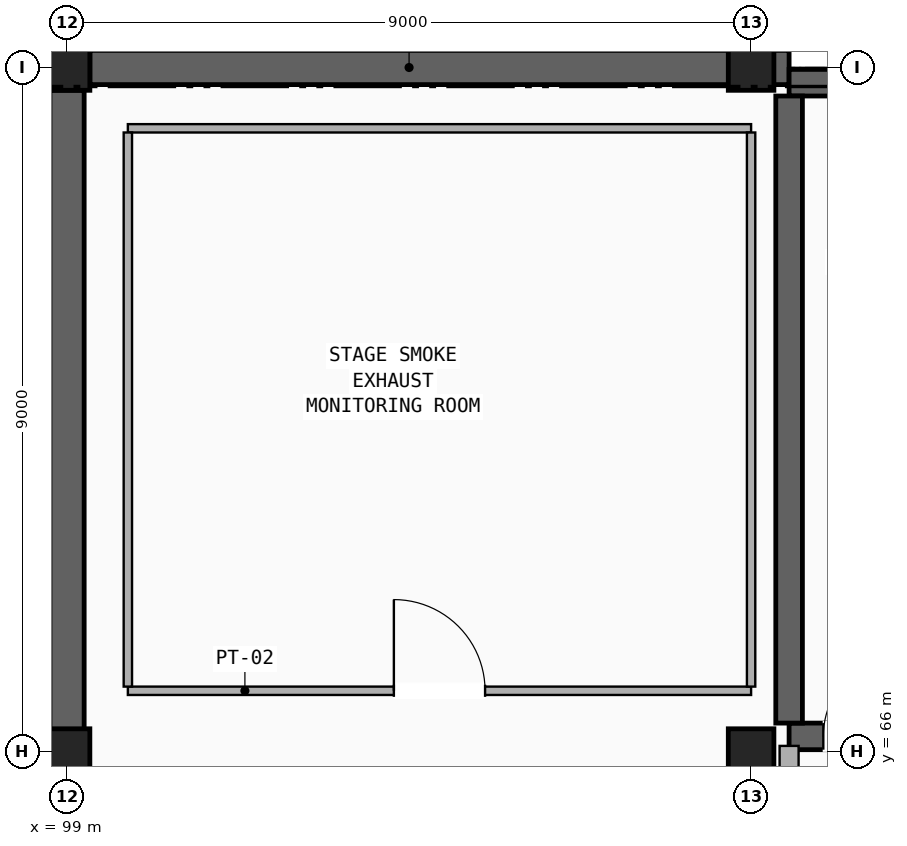
"""IFC4 building model, lengths in metres.
Left out: names, types, materials, properties, quantities, classifications, styles, units other than length and angle.
Written with IfcOpenShell. Run it as: python <this file> out.ifc"""

import sys

from ifc_helpers import new_model, si_unit, direction, frame, frame_2d, origin, origin_2d, place, context, subcontext, project, spatial, polyline, rectangle, outline, extrude, element, fill, save


model = new_model("IFC4")
c1 = context("Model", 3, precision=1e-05, world=origin(), true_north=direction((0.0, 1.0)))
c2 = subcontext(c1, "Body", "Model", "MODEL_VIEW")
j1 = project(units=[si_unit("LENGTHUNIT", "METRE"), si_unit("PLANEANGLEUNIT", "RADIAN")], contexts=[c1])
p1 = place(None, origin())
s1 = spatial("IfcSite", under=j1, at=p1, CompositionType="ELEMENT")
p2 = place(p1, origin())
s2 = spatial("IfcBuilding", under=s1, at=p2, CompositionType="ELEMENT")
p3 = place(p2, frame((0.0, 0.0, 21.76)))
s3 = spatial("IfcBuildingStorey", under=s2, at=p3, CompositionType="ELEMENT", Elevation=21.76)
p4 = place(p3, frame((99.0, 66.0, 0.0), z_axis=(0.0, 0.0, 1.0), x_axis=(1.0, 0.0, 0.0)))
e1 = element("IfcColumn", 1, at=p4, inside=s3, PredefinedType="COLUMN", context=c2, shape_type="SweptSolid", body=[
    extrude(rectangle(XDim=0.6, YDim=0.6, at=origin_2d()), origin(), (0.0, 0.0, 1.0), 8.217),
])
for number, where, z_axis, x_axis in (
    (2, (99.0, 75.0, 0.0), (0.0, 0.0, 1.0), (1.0, 0.0, 0.0)),
    (3, (108.0, 66.0, 0.0), (0.0, 0.0, 1.0), (1.0, 0.0, 0.0)),
    (4, (108.0, 75.0, 0.0), (0.0, 0.0, 1.0), (1.0, 0.0, 0.0)),
):
    element("IfcColumn", number, at=place(p3, frame(where, z_axis=z_axis, x_axis=x_axis)), inside=s3, PredefinedType="COLUMN", context=c2, shape_type="SweptSolid", body=[
        extrude(rectangle(XDim=0.6, YDim=0.6, at=origin_2d()), origin(), (0.0, 0.0, 1.0), 9.0),
    ])
p5 = place(p3, frame((99.3, 75.0, 0.0), z_axis=(0.0, 0.0, 1.0), x_axis=(1.0, 0.0, 0.0)))
e5 = element("IfcWall", 5, at=p5, inside=s3, PredefinedType="SHEAR", context=c2, shape_type="SweptSolid", body=[
    extrude(outline(polyline([(0.0, 0.0), (9.2, 0.0), (9.2, 11.285), (0.0, 12.791), (0.0, 0.0)])), frame((0.0, 0.225, 0.0), z_axis=(0.0, -1.0, 0.0), x_axis=(1.0, 0.0, 0.0)), (0.0, 0.0, 1.0), 0.45),
])
p6 = place(p3, frame((99.0, 37.3, 0.0), z_axis=(0.0, 0.0, 1.0), x_axis=(0.0, 1.0, 0.0)))
e6 = element("IfcWall", 6, at=p6, inside=s3, PredefinedType="SHEAR", context=c2, shape_type="SweptSolid", body=[
    extrude(rectangle(XDim=37.4, YDim=0.45, at=frame_2d((18.7, 0.0))), origin(), (0.0, 0.0, 1.0), 12.84),
])
p7 = place(p3, frame((108.5, 66.2, 0.0), z_axis=(0.0, 0.0, 1.0), x_axis=(1.0, 0.0, 0.0)))
e7 = element("IfcWall", 7, at=p7, inside=s3, PredefinedType="SHEAR", context=c2, shape_type="SweptSolid", body=[
    extrude(rectangle(XDim=10.3, YDim=0.35, at=frame_2d((5.15, 0.0))), origin(), (0.0, 0.0, 1.0), 9.78),
])
p8 = place(p7, frame((0.45, 0.0, 0.0)))
e8 = element("IfcOpeningElement", 8, at=p8, cuts=e7, PredefinedType="OPENING", context=c2, shape_type="SweptSolid", body=[
    extrude(rectangle(XDim=1.1, YDim=2.2, at=frame_2d((0.55, 1.1))), frame((0.0, 0.185, 0.0), z_axis=(0.0, -1.0, 0.0), x_axis=(1.0, 0.0, 0.0)), (0.0, 0.0, 1.0), 0.37),
])
p9 = place(p7, frame((2.09, 0.0, 0.0)))
e9 = element("IfcOpeningElement", 9, at=p9, cuts=e7, PredefinedType="OPENING", context=c2, shape_type="SweptSolid", body=[
    extrude(rectangle(XDim=1.22, YDim=2.2, at=frame_2d((0.61, 1.1))), frame((0.0, 0.185, 0.0), z_axis=(0.0, -1.0, 0.0), x_axis=(1.0, 0.0, 0.0)), (0.0, 0.0, 1.0), 0.37),
])
p10 = place(p7, frame((5.275, 0.0, 0.0)))
e10 = element("IfcOpeningElement", 10, at=p10, cuts=e7, PredefinedType="OPENING", context=c2, shape_type="SweptSolid", body=[
    extrude(rectangle(XDim=1.65, YDim=2.34, at=frame_2d((0.825, 1.17))), frame((0.0, 0.185, 0.0), z_axis=(0.0, -1.0, 0.0), x_axis=(1.0, 0.0, 0.0)), (0.0, 0.0, 1.0), 0.37),
])
p11 = place(p3, frame((108.5, 74.8, 0.0), z_axis=(0.0, 0.0, 1.0), x_axis=(1.0, 0.0, 0.0)))
e11 = element("IfcWall", 11, at=p11, inside=s3, PredefinedType="SHEAR", context=c2, shape_type="SweptSolid", body=[
    extrude(rectangle(XDim=10.3, YDim=0.35, at=frame_2d((5.15, 0.0))), origin(), (0.0, 0.0, 1.0), 9.78),
])
p12 = place(p3, frame((108.5, 66.375, 0.0), z_axis=(0.0, 0.0, 1.0), x_axis=(0.0, 1.0, 0.0)))
e12 = element("IfcWall", 12, at=p12, inside=s3, PredefinedType="SHEAR", context=c2, shape_type="SweptSolid", body=[
    extrude(rectangle(XDim=8.25, YDim=0.35, at=frame_2d((4.125, 0.0))), origin(), (0.0, 0.0, 1.0), 9.78),
])
p13 = place(p3, frame((108.5, 62.325, 0.0), z_axis=(0.0, 0.0, 1.0), x_axis=(0.0, 1.0, 0.0)))
e13 = element("IfcWall", 13, at=p13, inside=s3, PredefinedType="PARTITIONING", context=c2, shape_type="SweptSolid", body=[
    extrude(rectangle(XDim=3.75, YDim=0.25, at=frame_2d((1.875, 0.0))), origin(), (0.0, 0.0, 1.0), 8.78),
])
p14 = place(p3, frame((99.8, 66.8, 0.0), z_axis=(0.0, 0.0, 1.0), x_axis=(1.0, 0.0, 0.0)))
e14 = element("IfcWall", 14, at=p14, inside=s3, PredefinedType="PARTITIONING", context=c2, shape_type="SweptSolid", body=[
    extrude(rectangle(XDim=8.2, YDim=0.11, at=frame_2d((4.1, 0.0))), origin(), (0.0, 0.0, 1.0), 7.92),
])
p15 = place(p14, frame((3.5, 0.0, 0.0)))
e15 = element("IfcOpeningElement", 15, at=p15, cuts=e14, PredefinedType="OPENING", context=c2, shape_type="SweptSolid", body=[
    extrude(rectangle(XDim=1.2, YDim=2.2, at=frame_2d((0.6, 1.1))), frame((0.0, 0.065, 0.0), z_axis=(0.0, -1.0, 0.0), x_axis=(1.0, 0.0, 0.0)), (0.0, 0.0, 1.0), 0.13),
])
p16 = place(p3, frame((99.8, 74.2, 0.0), z_axis=(0.0, 0.0, 1.0), x_axis=(1.0, 0.0, 0.0)))
e16 = element("IfcWall", 16, at=p16, inside=s3, PredefinedType="PARTITIONING", context=c2, shape_type="SweptSolid", body=[
    extrude(rectangle(XDim=8.2, YDim=0.11, at=frame_2d((4.1, 0.0))), origin(), (0.0, 0.0, 1.0), 7.92),
])
p17 = place(p3, frame((99.8, 66.855, 0.0), z_axis=(0.0, 0.0, 1.0), x_axis=(0.0, 1.0, 0.0)))
e17 = element("IfcWall", 17, at=p17, inside=s3, PredefinedType="PARTITIONING", context=c2, shape_type="SweptSolid", body=[
    extrude(rectangle(XDim=7.29, YDim=0.11, at=frame_2d((3.645, 0.0))), origin(), (0.0, 0.0, 1.0), 8.78),
])
p18 = place(p3, frame((108.0, 66.855, 0.0), z_axis=(0.0, 0.0, 1.0), x_axis=(0.0, 1.0, 0.0)))
e18 = element("IfcWall", 18, at=p18, inside=s3, PredefinedType="PARTITIONING", context=c2, shape_type="SweptSolid", body=[
    extrude(rectangle(XDim=7.29, YDim=0.11, at=frame_2d((3.645, 0.0))), origin(), (0.0, 0.0, 1.0), 7.92),
])
p19 = place(p8, origin())
e19 = element("IfcDoor", 19, at=p19, inside=s3, OperationType="SINGLE_SWING_RIGHT", PredefinedType="DOOR", context=c2, shape_type="SweptSolid", body=[
    extrude(rectangle(XDim=1.1, YDim=2.2, at=frame_2d((0.55, 1.1))), frame((0.0, 0.025, 0.0), z_axis=(0.0, -1.0, 0.0), x_axis=(1.0, 0.0, 0.0)), (0.0, 0.0, 1.0), 0.05),
])
fill(e8, e19)
p20 = place(p15, origin())
e20 = element("IfcDoor", 20, at=p20, inside=s3, OperationType="SINGLE_SWING_LEFT", PredefinedType="DOOR", context=c2, shape_type="SweptSolid", body=[
    extrude(rectangle(XDim=1.2, YDim=2.2, at=frame_2d((0.6, 1.1))), frame((0.0, 0.025, 0.0), z_axis=(0.0, -1.0, 0.0), x_axis=(1.0, 0.0, 0.0)), (0.0, 0.0, 1.0), 0.05),
])
fill(e15, e20)
save(model, sys.argv[1])
